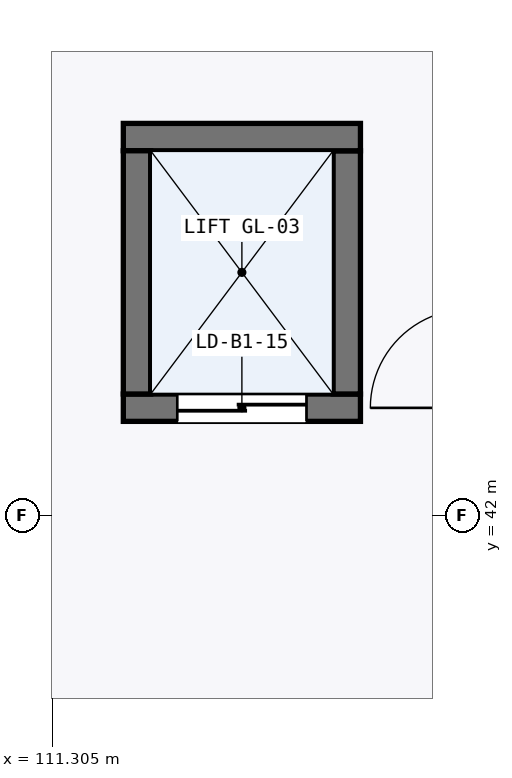
"""IFC4 building model, lengths in metres.
Left out: names, types, materials, properties, quantities, classifications, styles, units other than length and angle.
Written with IfcOpenShell. Run it as: python <this file> out.ifc"""

import sys

from ifc_helpers import new_model, si_unit, direction, frame, frame_2d, origin, place, context, subcontext, project, spatial, rectangle, extrude, element, fill, save


model = new_model("IFC4")
c1 = context("Model", 3, precision=1e-05, world=origin(), true_north=direction((0.0, 1.0)))
c2 = subcontext(c1, "Body", "Model", "MODEL_VIEW")
j1 = project(units=[si_unit("LENGTHUNIT", "METRE"), si_unit("PLANEANGLEUNIT", "RADIAN")], contexts=[c1])
p1 = place(None, origin())
s1 = spatial("IfcSite", under=j1, at=p1, CompositionType="ELEMENT")
p2 = place(p1, origin())
s2 = spatial("IfcBuilding", under=s1, at=p2, CompositionType="ELEMENT")
p3 = place(p2, frame((0.0, 0.0, -5.4)))
s3 = spatial("IfcBuildingStorey", under=s2, at=p3, CompositionType="ELEMENT", Elevation=-5.4)
p4 = place(p3, frame((112.24, 43.42, 0.0), z_axis=(0.0, 0.0, 1.0), x_axis=(1.0, 0.0, 0.0)))
e1 = element("IfcWall", 1, at=p4, inside=s3, PredefinedType="SHEAR", context=c2, shape_type="SweptSolid", body=[
    extrude(rectangle(XDim=3.12, YDim=0.36, at=frame_2d((1.56, 0.0))), origin(), (0.0, 0.0, 1.0), 5.145),
])
p5 = place(p4, frame((0.71, 0.0, 0.0)))
e2 = element("IfcOpeningElement", 2, at=p5, cuts=e1, PredefinedType="OPENING", context=c2, shape_type="SweptSolid", body=[
    extrude(rectangle(XDim=1.7, YDim=2.3, at=frame_2d((0.85, 1.15))), frame((0.0, 0.19, 0.0), z_axis=(0.0, -1.0, 0.0), x_axis=(1.0, 0.0, 0.0)), (0.0, 0.0, 1.0), 0.38),
])
p6 = place(p3, frame((115.18, 43.6, 0.0), z_axis=(0.0, 0.0, 1.0), x_axis=(0.0, 1.0, 0.0)))
e3 = element("IfcWall", 3, at=p6, inside=s3, PredefinedType="SHEAR", context=c2, shape_type="SweptSolid", body=[
    extrude(rectangle(XDim=3.2, YDim=0.36, at=frame_2d((1.6, 0.0))), origin(), (0.0, 0.0, 1.0), 5.145),
])
p7 = place(p3, frame((115.36, 46.98, 0.0), z_axis=(0.0, 0.0, 1.0), x_axis=(-1.0, 0.0, 0.0)))
e4 = element("IfcWall", 4, at=p7, inside=s3, PredefinedType="SHEAR", context=c2, shape_type="SweptSolid", body=[
    extrude(rectangle(XDim=3.12, YDim=0.36, at=frame_2d((1.56, 0.0))), origin(), (0.0, 0.0, 1.0), 5.145),
])
p8 = place(p3, frame((112.42, 46.8, 0.0), z_axis=(0.0, 0.0, 1.0), x_axis=(0.0, -1.0, 0.0)))
e5 = element("IfcWall", 5, at=p8, inside=s3, PredefinedType="SHEAR", context=c2, shape_type="SweptSolid", body=[
    extrude(rectangle(XDim=3.2, YDim=0.36, at=frame_2d((1.6, 0.0))), origin(), (0.0, 0.0, 1.0), 5.145),
])
p9 = place(p5, frame((1.7, 0.0, 0.0), z_axis=(0.0, 0.0, 1.0), x_axis=(-1.0, 0.0, 0.0)))
e6 = element("IfcDoor", 6, at=p9, inside=s3, OperationType="DOUBLE_DOOR_SLIDING", PredefinedType="DOOR", context=c2, shape_type="SweptSolid", body=[
    extrude(rectangle(XDim=1.7, YDim=2.3, at=frame_2d((0.85, 1.15))), frame((0.0, 0.025, 0.0), z_axis=(0.0, -1.0, 0.0), x_axis=(1.0, 0.0, 0.0)), (0.0, 0.0, 1.0), 0.05),
])
fill(e2, e6)
save(model, sys.argv[1])
